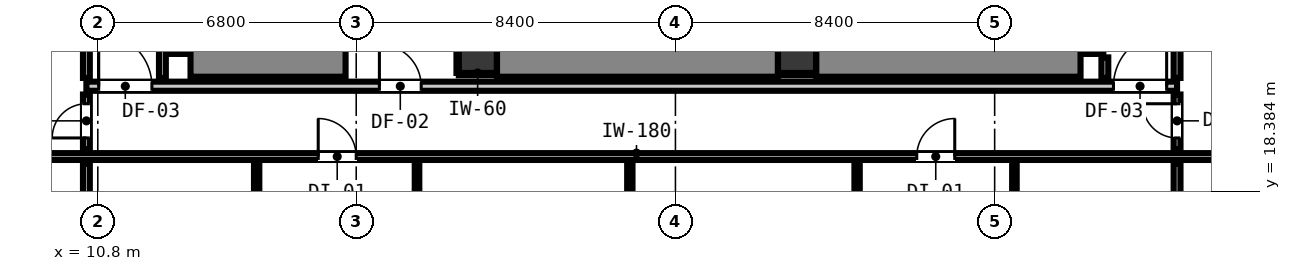
"""IFC4 building model, lengths in metres.
Left out: names, types, materials, properties, quantities, classifications, styles, units other than length and angle.
Written with IfcOpenShell. Run it as: python <this file> out.ifc"""

import sys

from ifc_helpers import new_model, si_unit, direction, frame, frame_2d, origin, origin_2d, place, context, subcontext, project, spatial, rectangle, extrude, element, fill, save


model = new_model("IFC4")
c1 = context("Model", 3, precision=1e-05, world=origin(), true_north=direction((0.0, 1.0)))
c2 = subcontext(c1, "Body", "Model", "MODEL_VIEW")
j1 = project(units=[si_unit("LENGTHUNIT", "METRE"), si_unit("PLANEANGLEUNIT", "RADIAN")], contexts=[c1])
p1 = place(None, origin())
s1 = spatial("IfcSite", under=j1, at=p1, CompositionType="ELEMENT")
p2 = place(p1, origin())
s2 = spatial("IfcBuilding", under=s1, at=p2, CompositionType="ELEMENT")
p3 = place(p2, frame((0.0, 0.0, 5.2)))
s3 = spatial("IfcBuildingStorey", under=s2, at=p3, CompositionType="ELEMENT", Elevation=5.2)
for number, where, z_axis, x_axis in (
    (1, (20.8, 22.0, 0.0), (0.0, 0.0, 1.0), (1.0, 0.0, 0.0)),
    (2, (29.2, 22.0, 0.0), (0.0, 0.0, 1.0), (1.0, 0.0, 0.0)),
):
    element("IfcColumn", number, at=place(p3, frame(where, z_axis=z_axis, x_axis=x_axis)), inside=s3, PredefinedType="COLUMN", context=c2, shape_type="SweptSolid", body=[
        extrude(rectangle(XDim=1.0, YDim=1.0, at=origin_2d()), origin(), (0.0, 0.0, 1.0), 4.2),
    ])
p4 = place(p3, frame((13.24, 22.0, 0.0), z_axis=(0.0, 0.0, 1.0), x_axis=(0.0, 1.0, 0.0)))
e3 = element("IfcWall", 3, at=p4, inside=s3, PredefinedType="SHEAR", context=c2, shape_type="SweptSolid", body=[
    extrude(rectangle(XDim=8.195, YDim=1.2, at=frame_2d((4.098, 0.0))), origin(), (0.0, 0.0, 1.0), 4.2),
])
p5 = place(p3, frame((13.24, 22.0, 0.0), z_axis=(0.0, 0.0, 1.0), x_axis=(1.0, 0.0, 0.0)))
e4 = element("IfcWall", 4, at=p5, inside=s3, PredefinedType="SHEAR", context=c2, shape_type="SweptSolid", body=[
    extrude(rectangle(XDim=4.08, YDim=1.2, at=frame_2d((2.04, 0.0))), origin(), (0.0, 0.0, 1.0), 4.2),
])
p6 = place(p3, frame((36.66, 22.0, 0.0), z_axis=(0.0, 0.0, 1.0), x_axis=(0.0, 1.0, 0.0)))
e5 = element("IfcWall", 5, at=p6, inside=s3, PredefinedType="SHEAR", context=c2, shape_type="SweptSolid", body=[
    extrude(rectangle(XDim=8.195, YDim=1.2, at=frame_2d((4.098, 0.0))), origin(), (0.0, 0.0, 1.0), 4.2),
])
p7 = place(p3, frame((29.705, 22.0, 0.0), z_axis=(0.0, 0.0, 1.0), x_axis=(1.0, 0.0, 0.0)))
e6 = element("IfcWall", 6, at=p7, inside=s3, PredefinedType="SHEAR", context=c2, shape_type="SweptSolid", body=[
    extrude(rectangle(XDim=6.955, YDim=1.2, at=frame_2d((3.478, 0.0))), origin(), (0.0, 0.0, 1.0), 4.2),
])
p8 = place(p3, frame((21.305, 22.0, 0.0), z_axis=(0.0, 0.0, 1.0), x_axis=(1.0, 0.0, 0.0)))
e7 = element("IfcWall", 7, at=p8, inside=s3, PredefinedType="SHEAR", context=c2, shape_type="SweptSolid", body=[
    extrude(rectangle(XDim=7.39, YDim=1.2, at=frame_2d((3.695, 0.0))), origin(), (0.0, 0.0, 1.0), 4.2),
])
p9 = place(p3, frame((10.5, 21.15, 0.0), z_axis=(0.0, 0.0, 1.0), x_axis=(1.0, 0.0, 0.0)))
e8 = element("IfcWall", 8, at=p9, inside=s3, PredefinedType="PARTITIONING", context=c2, shape_type="SweptSolid", body=[
    extrude(rectangle(XDim=28.7, YDim=0.24, at=frame_2d((14.35, 0.0))), origin(), (0.0, 0.0, 1.0), 3.92),
])
p10 = place(p9, frame((7.71, 0.0, 0.0)))
e9 = element("IfcOpeningElement", 9, at=p10, cuts=e8, PredefinedType="OPENING", context=c2, shape_type="SweptSolid", body=[
    extrude(rectangle(XDim=1.1, YDim=2.15, at=frame_2d((0.55, 1.075))), frame((0.0, 0.13, 0.0), z_axis=(0.0, -1.0, 0.0), x_axis=(1.0, 0.0, 0.0)), (0.0, 0.0, 1.0), 0.26),
])
p11 = place(p9, frame((0.324, 0.0, 0.0)))
e10 = element("IfcOpeningElement", 10, at=p11, cuts=e8, PredefinedType="OPENING", context=c2, shape_type="SweptSolid", body=[
    extrude(rectangle(XDim=1.4, YDim=2.15, at=frame_2d((0.7, 1.075))), frame((0.0, 0.13, 0.0), z_axis=(0.0, -1.0, 0.0), x_axis=(1.0, 0.0, 0.0)), (0.0, 0.0, 1.0), 0.26),
])
p12 = place(p9, frame((27.026, 0.0, 0.0)))
e11 = element("IfcOpeningElement", 11, at=p12, cuts=e8, PredefinedType="OPENING", context=c2, shape_type="SweptSolid", body=[
    extrude(rectangle(XDim=1.4, YDim=2.15, at=frame_2d((0.7, 1.075))), frame((0.0, 0.13, 0.0), z_axis=(0.0, -1.0, 0.0), x_axis=(1.0, 0.0, 0.0)), (0.0, 0.0, 1.0), 0.26),
])
p13 = place(p3, frame((4.352, 19.3, 0.0), z_axis=(0.0, 0.0, 1.0), x_axis=(1.0, 0.0, 0.0)))
e12 = element("IfcWall", 12, at=p13, inside=s3, PredefinedType="PARTITIONING", context=c2, shape_type="SweptSolid", body=[
    extrude(rectangle(XDim=43.296, YDim=0.18, at=frame_2d((21.648, 0.0))), origin(), (0.0, 0.0, 1.0), 3.92),
])
p14 = place(p13, frame((12.248, 0.0, 0.0)))
e13 = element("IfcOpeningElement", 13, at=p14, cuts=e12, PredefinedType="OPENING", context=c2, shape_type="SweptSolid", body=[
    extrude(rectangle(XDim=1.0, YDim=2.15, at=frame_2d((0.5, 1.075))), frame((0.0, 0.1, 0.0), z_axis=(0.0, -1.0, 0.0), x_axis=(1.0, 0.0, 0.0)), (0.0, 0.0, 1.0), 0.2),
])
p15 = place(p13, frame((27.998, 0.0, 0.0)))
e14 = element("IfcOpeningElement", 14, at=p15, cuts=e12, PredefinedType="OPENING", context=c2, shape_type="SweptSolid", body=[
    extrude(rectangle(XDim=1.0, YDim=2.15, at=frame_2d((0.5, 1.075))), frame((0.0, 0.1, 0.0), z_axis=(0.0, -1.0, 0.0), x_axis=(1.0, 0.0, 0.0)), (0.0, 0.0, 1.0), 0.2),
])
p16 = place(p3, frame((10.5, 16.372, 0.0), z_axis=(0.0, 0.0, 1.0), x_axis=(0.0, 1.0, 0.0)))
e15 = element("IfcWall", 15, at=p16, inside=s3, PredefinedType="PARTITIONING", context=c2, shape_type="SweptSolid", body=[
    extrude(rectangle(XDim=2.74, YDim=0.18, at=frame_2d((1.37, 0.0))), origin(), (0.0, 0.0, 1.0), 3.92),
])
p17 = place(p3, frame((10.5, 19.488, 0.0), z_axis=(0.0, 0.0, 1.0), x_axis=(0.0, 1.0, 0.0)))
e16 = element("IfcWall", 16, at=p17, inside=s3, PredefinedType="PARTITIONING", context=c2, shape_type="SweptSolid", body=[
    extrude(rectangle(XDim=1.444, YDim=0.18, at=frame_2d((0.722, 0.0))), origin(), (0.0, 0.0, 1.0), 3.92),
])
p18 = place(p17, frame((0.301, 0.0, 0.0)))
e17 = element("IfcOpeningElement", 17, at=p18, cuts=e16, PredefinedType="OPENING", context=c2, shape_type="SweptSolid", body=[
    extrude(rectangle(XDim=0.9, YDim=2.1, at=frame_2d((0.45, 1.05))), frame((0.0, 0.1, 0.0), z_axis=(0.0, -1.0, 0.0), x_axis=(1.0, 0.0, 0.0)), (0.0, 0.0, 1.0), 0.2),
])
for number, where, z_axis, x_axis in (
    (18, (10.5, 21.368, 0.0), (0.0, 0.0, 1.0), (0.0, 1.0, 0.0)),
    (19, (12.5, 21.368, 0.0), (0.0, 0.0, 1.0), (0.0, 1.0, 0.0)),
):
    element("IfcWall", number, at=place(p3, frame(where, z_axis=z_axis, x_axis=x_axis)), inside=s3, PredefinedType="PARTITIONING", context=c2, shape_type="SweptSolid", body=[
        extrude(rectangle(XDim=18.694, YDim=0.18, at=frame_2d((9.347, 0.0))), origin(), (0.0, 0.0, 1.0), 3.92),
    ])
p19 = place(p3, frame((37.3, 21.368, 0.0), z_axis=(0.0, 0.0, 1.0), x_axis=(0.0, 1.0, 0.0)))
e20 = element("IfcWall", 20, at=p19, inside=s3, PredefinedType="PARTITIONING", context=c2, shape_type="SweptSolid", body=[
    extrude(rectangle(XDim=0.54, YDim=0.18, at=frame_2d((0.27, 0.0))), origin(), (0.0, 0.0, 1.0), 3.92),
])
p20 = place(p3, frame((39.2, 12.258, 0.0), z_axis=(0.0, 0.0, 1.0), x_axis=(0.0, 1.0, 0.0)))
e21 = element("IfcWall", 21, at=p20, inside=s3, PredefinedType="PARTITIONING", context=c2, shape_type="SweptSolid", body=[
    extrude(rectangle(XDim=6.854, YDim=0.18, at=frame_2d((3.427, 0.0))), origin(), (0.0, 0.0, 1.0), 3.92),
])
p21 = place(p3, frame((39.2, 19.488, 0.0), z_axis=(0.0, 0.0, 1.0), x_axis=(0.0, 1.0, 0.0)))
e22 = element("IfcWall", 22, at=p21, inside=s3, PredefinedType="PARTITIONING", context=c2, shape_type="SweptSolid", body=[
    extrude(rectangle(XDim=1.444, YDim=0.18, at=frame_2d((0.722, 0.0))), origin(), (0.0, 0.0, 1.0), 3.92),
])
p22 = place(p21, frame((0.301, 0.0, 0.0)))
e23 = element("IfcOpeningElement", 23, at=p22, cuts=e22, PredefinedType="OPENING", context=c2, shape_type="SweptSolid", body=[
    extrude(rectangle(XDim=0.9, YDim=2.1, at=frame_2d((0.45, 1.05))), frame((0.0, 0.1, 0.0), z_axis=(0.0, -1.0, 0.0), x_axis=(1.0, 0.0, 0.0)), (0.0, 0.0, 1.0), 0.2),
])
p23 = place(p3, frame((39.2, 21.368, 0.0), z_axis=(0.0, 0.0, 1.0), x_axis=(0.0, 1.0, 0.0)))
e24 = element("IfcWall", 24, at=p23, inside=s3, PredefinedType="PARTITIONING", context=c2, shape_type="SweptSolid", body=[
    extrude(rectangle(XDim=18.694, YDim=0.18, at=frame_2d((9.347, 0.0))), origin(), (0.0, 0.0, 1.0), 3.92),
])
p24 = place(p3, frame((14.98, 16.352, 0.0), z_axis=(0.0, 0.0, 1.0), x_axis=(0.0, 1.0, 0.0)))
e25 = element("IfcWall", 25, at=p24, inside=s3, PredefinedType="PARTITIONING", context=c2, shape_type="SweptSolid", body=[
    extrude(rectangle(XDim=2.78, YDim=0.14, at=frame_2d((1.39, 0.0))), origin(), (0.0, 0.0, 1.0), 3.92),
])
p25 = place(p24, frame((0.957, 0.0, 0.0)))
e26 = element("IfcOpeningElement", 26, at=p25, cuts=e25, PredefinedType="OPENING", context=c2, shape_type="SweptSolid", body=[
    extrude(rectangle(XDim=0.86, YDim=2.02, at=frame_2d((0.43, 1.01))), frame((0.0, 0.08, 0.0), z_axis=(0.0, -1.0, 0.0), x_axis=(1.0, 0.0, 0.0)), (0.0, 0.0, 1.0), 0.16),
])
p26 = place(p3, frame((24.8, 16.352, 0.0), z_axis=(0.0, 0.0, 1.0), x_axis=(0.0, 1.0, 0.0)))
e27 = element("IfcWall", 27, at=p26, inside=s3, PredefinedType="PARTITIONING", context=c2, shape_type="SweptSolid", body=[
    extrude(rectangle(XDim=2.78, YDim=0.14, at=frame_2d((1.39, 0.0))), origin(), (0.0, 0.0, 1.0), 3.92),
])
p27 = place(p3, frame((30.78, 16.352, 0.0), z_axis=(0.0, 0.0, 1.0), x_axis=(0.0, 1.0, 0.0)))
e28 = element("IfcWall", 28, at=p27, inside=s3, PredefinedType="PARTITIONING", context=c2, shape_type="SweptSolid", body=[
    extrude(rectangle(XDim=2.78, YDim=0.14, at=frame_2d((1.39, 0.0))), origin(), (0.0, 0.0, 1.0), 3.92),
])
p28 = place(p27, frame((0.957, 0.0, 0.0)))
e29 = element("IfcOpeningElement", 29, at=p28, cuts=e28, PredefinedType="OPENING", context=c2, shape_type="SweptSolid", body=[
    extrude(rectangle(XDim=0.86, YDim=2.02, at=frame_2d((0.43, 1.01))), frame((0.0, 0.08, 0.0), z_axis=(0.0, -1.0, 0.0), x_axis=(1.0, 0.0, 0.0)), (0.0, 0.0, 1.0), 0.16),
])
p29 = place(p3, frame((19.2, 16.339, 0.0), z_axis=(0.0, 0.0, 1.0), x_axis=(0.0, 1.0, 0.0)))
e30 = element("IfcWall", 30, at=p29, inside=s3, PredefinedType="PARTITIONING", context=c2, shape_type="SweptSolid", body=[
    extrude(rectangle(XDim=2.803, YDim=0.12, at=frame_2d((1.401, 0.0))), origin(), (0.0, 0.0, 1.0), 3.92),
])
p30 = place(p29, frame((0.95, 0.0, 0.0)))
e31 = element("IfcOpeningElement", 31, at=p30, cuts=e30, PredefinedType="OPENING", context=c2, shape_type="SweptSolid", body=[
    extrude(rectangle(XDim=0.9, YDim=2.1, at=frame_2d((0.45, 1.05))), frame((0.0, 0.07, 0.0), z_axis=(0.0, -1.0, 0.0), x_axis=(1.0, 0.0, 0.0)), (0.0, 0.0, 1.0), 0.14),
])
p31 = place(p3, frame((34.92, 12.228, 0.0), z_axis=(0.0, 0.0, 1.0), x_axis=(0.0, 1.0, 0.0)))
e32 = element("IfcWall", 32, at=p31, inside=s3, PredefinedType="PARTITIONING", context=c2, shape_type="SweptSolid", body=[
    extrude(rectangle(XDim=6.914, YDim=0.12, at=frame_2d((3.457, 0.0))), origin(), (0.0, 0.0, 1.0), 3.92),
])
p32 = place(p31, frame((3.022, 0.0, 0.0)))
e33 = element("IfcOpeningElement", 33, at=p32, cuts=e32, PredefinedType="OPENING", context=c2, shape_type="SweptSolid", body=[
    extrude(rectangle(XDim=0.9, YDim=2.1, at=frame_2d((0.45, 1.05))), frame((0.0, 0.07, 0.0), z_axis=(0.0, -1.0, 0.0), x_axis=(1.0, 0.0, 0.0)), (0.0, 0.0, 1.0), 0.14),
])
p33 = place(p3, frame((20.3, 21.468, 0.0), z_axis=(0.0, 0.0, 1.0), x_axis=(1.0, 0.0, 0.0)))
e34 = element("IfcWall", 34, at=p33, inside=s3, PredefinedType="PARTITIONING", context=c2, shape_type="SweptSolid", body=[
    extrude(rectangle(XDim=0.99, YDim=0.06, at=frame_2d((0.495, 0.0))), origin(), (0.0, 0.0, 1.0), 1.45),
])
p34 = place(p3, frame((20.268, 21.5, 0.0), z_axis=(0.0, 0.0, 1.0), x_axis=(0.0, 1.0, 0.0)))
e35 = element("IfcWall", 35, at=p34, inside=s3, PredefinedType="PARTITIONING", context=c2, shape_type="SweptSolid", body=[
    extrude(rectangle(XDim=1.0, YDim=0.06, at=frame_2d((0.5, 0.0))), origin(), (0.0, 0.0, 1.0), 1.45),
])
p35 = place(p3, frame((28.71, 21.468, 0.0), z_axis=(0.0, 0.0, 1.0), x_axis=(1.0, 0.0, 0.0)))
e36 = element("IfcWall", 36, at=p35, inside=s3, PredefinedType="PARTITIONING", context=c2, shape_type="SweptSolid", body=[
    extrude(rectangle(XDim=0.98, YDim=0.06, at=frame_2d((0.49, 0.0))), origin(), (0.0, 0.0, 1.0), 1.45),
])
p36 = place(p10, origin())
e37 = element("IfcDoor", 37, at=p36, inside=s3, OperationType="SINGLE_SWING_LEFT", PredefinedType="DOOR", context=c2, shape_type="SweptSolid", body=[
    extrude(rectangle(XDim=1.1, YDim=2.15, at=frame_2d((0.55, 1.075))), frame((0.0, 0.025, 0.0), z_axis=(0.0, -1.0, 0.0), x_axis=(1.0, 0.0, 0.0)), (0.0, 0.0, 1.0), 0.05),
])
fill(e9, e37)
p37 = place(p11, origin())
e38 = element("IfcDoor", 38, at=p37, inside=s3, OperationType="SINGLE_SWING_LEFT", PredefinedType="DOOR", context=c2, shape_type="SweptSolid", body=[
    extrude(rectangle(XDim=1.4, YDim=2.15, at=frame_2d((0.7, 1.075))), frame((0.0, 0.025, 0.0), z_axis=(0.0, -1.0, 0.0), x_axis=(1.0, 0.0, 0.0)), (0.0, 0.0, 1.0), 0.05),
])
fill(e10, e38)
p38 = place(p12, origin())
e39 = element("IfcDoor", 39, at=p38, inside=s3, OperationType="SINGLE_SWING_RIGHT", PredefinedType="DOOR", context=c2, shape_type="SweptSolid", body=[
    extrude(rectangle(XDim=1.4, YDim=2.15, at=frame_2d((0.7, 1.075))), frame((0.0, 0.025, 0.0), z_axis=(0.0, -1.0, 0.0), x_axis=(1.0, 0.0, 0.0)), (0.0, 0.0, 1.0), 0.05),
])
fill(e11, e39)
p39 = place(p18, origin())
e40 = element("IfcDoor", 40, at=p39, inside=s3, OperationType="SINGLE_SWING_LEFT", PredefinedType="DOOR", context=c2, shape_type="SweptSolid", body=[
    extrude(rectangle(XDim=0.9, YDim=2.1, at=frame_2d((0.45, 1.05))), frame((0.0, 0.025, 0.0), z_axis=(0.0, -1.0, 0.0), x_axis=(1.0, 0.0, 0.0)), (0.0, 0.0, 1.0), 0.05),
])
fill(e17, e40)
p40 = place(p22, origin())
e41 = element("IfcDoor", 41, at=p40, inside=s3, OperationType="SINGLE_SWING_RIGHT", PredefinedType="DOOR", context=c2, shape_type="SweptSolid", body=[
    extrude(rectangle(XDim=0.9, YDim=2.1, at=frame_2d((0.45, 1.05))), frame((0.0, 0.025, 0.0), z_axis=(0.0, -1.0, 0.0), x_axis=(1.0, 0.0, 0.0)), (0.0, 0.0, 1.0), 0.05),
])
fill(e23, e41)
p41 = place(p14, origin())
e42 = element("IfcDoor", 42, at=p41, inside=s3, OperationType="SINGLE_SWING_LEFT", PredefinedType="DOOR", context=c2, shape_type="SweptSolid", body=[
    extrude(rectangle(XDim=1.0, YDim=2.15, at=frame_2d((0.5, 1.075))), frame((0.0, 0.025, 0.0), z_axis=(0.0, -1.0, 0.0), x_axis=(1.0, 0.0, 0.0)), (0.0, 0.0, 1.0), 0.05),
])
fill(e13, e42)
p42 = place(p15, origin())
e43 = element("IfcDoor", 43, at=p42, inside=s3, OperationType="SINGLE_SWING_RIGHT", PredefinedType="DOOR", context=c2, shape_type="SweptSolid", body=[
    extrude(rectangle(XDim=1.0, YDim=2.15, at=frame_2d((0.5, 1.075))), frame((0.0, 0.025, 0.0), z_axis=(0.0, -1.0, 0.0), x_axis=(1.0, 0.0, 0.0)), (0.0, 0.0, 1.0), 0.05),
])
fill(e14, e43)
save(model, sys.argv[1])
